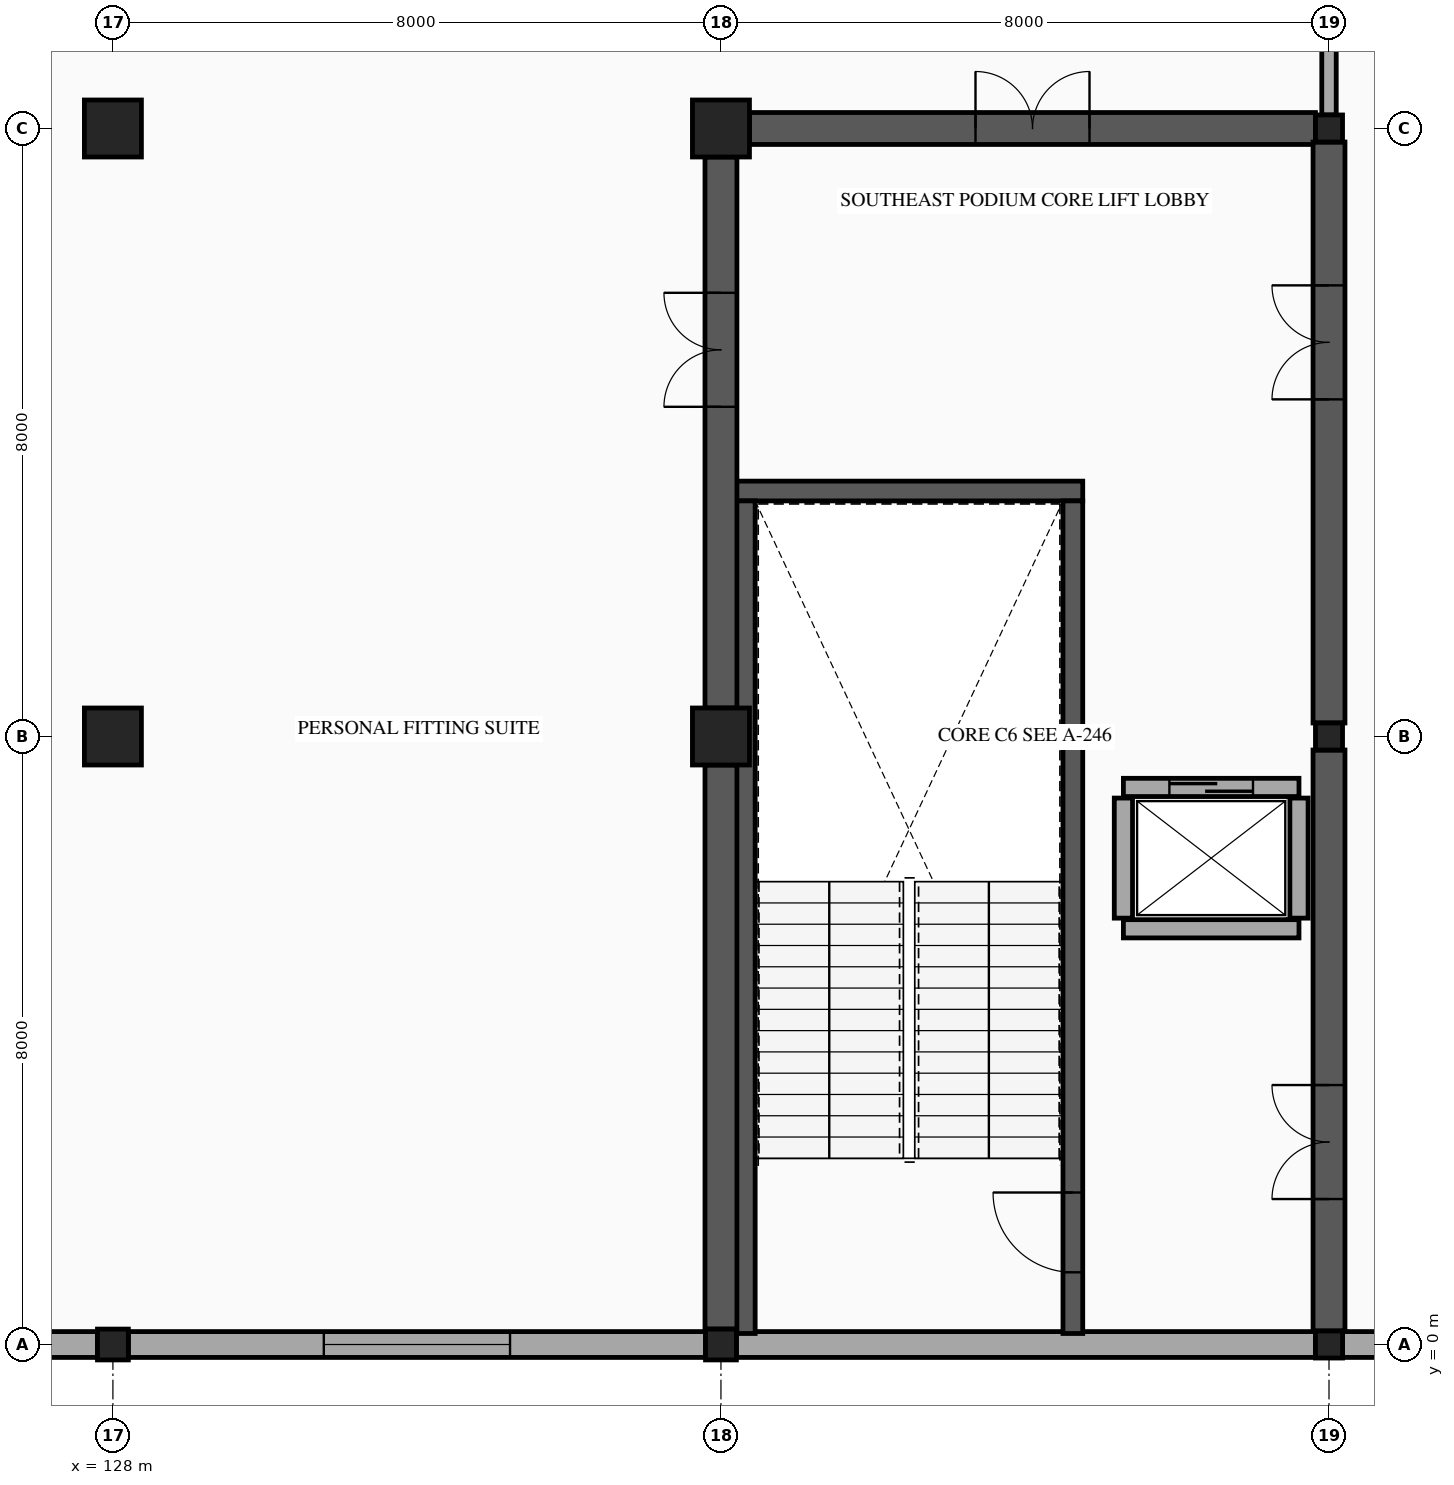
"""IFC4 building model, lengths in metres.
Left out: names, types, materials, properties, quantities, classifications, styles, units other than length and angle.
Written with IfcOpenShell. Run it as: python <this file> out.ifc"""

import sys

from ifc_helpers import new_model, si_unit, direction, frame, frame_2d, origin, origin_2d, place, context, subcontext, project, spatial, rectangle, hollow_rectangle, extrude, element, fill, save


model = new_model("IFC4")
c1 = context("Model", 3, precision=1e-05, world=origin(), true_north=direction((0.0, 1.0)))
c2 = subcontext(c1, "Body", "Model", "MODEL_VIEW")
j1 = project(units=[si_unit("LENGTHUNIT", "METRE"), si_unit("PLANEANGLEUNIT", "RADIAN")], contexts=[c1])
p1 = place(None, origin())
s1 = spatial("IfcSite", under=j1, at=p1, CompositionType="ELEMENT")
p2 = place(p1, origin())
s2 = spatial("IfcBuilding", under=s1, at=p2, CompositionType="ELEMENT")
p3 = place(p2, frame((0.0, 0.0, 5.6)))
s3 = spatial("IfcBuildingStorey", under=s2, at=p3, CompositionType="ELEMENT", Elevation=5.6)
p4 = place(p3, frame((128.0, 0.0, 0.0), z_axis=(0.0, 0.0, 1.0), x_axis=(1.0, 0.0, 0.0)))
e1 = element("IfcColumn", 1, at=p4, inside=s3, PredefinedType="COLUMN", context=c2, shape_type="SweptSolid", body=[
    extrude(hollow_rectangle(XDim=0.406, YDim=0.406, WallThickness=0.015, InnerFilletRadius=0.015, OuterFilletRadius=0.029, at=origin_2d()), origin(), (0.0, 0.0, 1.0), 4.8),
])
for number, where, z_axis, x_axis in (
    (2, (128.0, 8.0, 0.0), (0.0, 0.0, 1.0), (1.0, 0.0, 0.0)),
    (3, (128.0, 16.0, 0.0), (0.0, 0.0, 1.0), (1.0, 0.0, 0.0)),
):
    element("IfcColumn", number, at=place(p3, frame(where, z_axis=z_axis, x_axis=x_axis)), inside=s3, PredefinedType="COLUMN", context=c2, shape_type="SweptSolid", body=[
        extrude(rectangle(XDim=0.75, YDim=0.75, at=origin_2d()), origin(), (0.0, 0.0, 1.0), 4.8),
    ])
p5 = place(p3, frame((136.0, 0.0, 0.0), z_axis=(0.0, 0.0, 1.0), x_axis=(1.0, 0.0, 0.0)))
e4 = element("IfcColumn", 4, at=p5, inside=s3, PredefinedType="COLUMN", context=c2, shape_type="SweptSolid", body=[
    extrude(hollow_rectangle(XDim=0.406, YDim=0.406, WallThickness=0.015, InnerFilletRadius=0.015, OuterFilletRadius=0.029, at=origin_2d()), origin(), (0.0, 0.0, 1.0), 4.8),
])
for number, where, z_axis, x_axis in (
    (5, (136.0, 8.0, 0.0), (0.0, 0.0, 1.0), (1.0, 0.0, 0.0)),
    (6, (136.0, 16.0, 0.0), (0.0, 0.0, 1.0), (1.0, 0.0, 0.0)),
):
    element("IfcColumn", number, at=place(p3, frame(where, z_axis=z_axis, x_axis=x_axis)), inside=s3, PredefinedType="COLUMN", context=c2, shape_type="SweptSolid", body=[
        extrude(rectangle(XDim=0.75, YDim=0.75, at=origin_2d()), origin(), (0.0, 0.0, 1.0), 4.8),
    ])
for number, where, z_axis, x_axis in (
    (7, (144.0, 0.0, 0.0), (0.0, 0.0, 1.0), (1.0, 0.0, 0.0)),
    (8, (144.0, 8.0, 0.0), (0.0, 0.0, 1.0), (1.0, 0.0, 0.0)),
    (9, (144.0, 16.0, 0.0), (0.0, 0.0, 1.0), (1.0, 0.0, 0.0)),
):
    element("IfcColumn", number, at=place(p3, frame(where, z_axis=z_axis, x_axis=x_axis)), inside=s3, PredefinedType="COLUMN", context=c2, shape_type="SweptSolid", body=[
        extrude(hollow_rectangle(XDim=0.356, YDim=0.356, WallThickness=0.012, InnerFilletRadius=0.012, OuterFilletRadius=0.024, at=origin_2d()), origin(), (0.0, 0.0, 1.0), 4.8),
    ])
p6 = place(p3, frame((151.822, 0.0, 0.0), z_axis=(0.0, 0.0, 1.0), x_axis=(-1.0, 0.0, 0.0)))
e10 = element("IfcWall", 10, at=p6, inside=s3, PredefinedType="STANDARD", context=c2, shape_type="SweptSolid", body=[
    extrude(rectangle(XDim=7.644, YDim=0.34, at=frame_2d((3.822, 0.0))), origin(), (0.0, 0.0, 1.0), 3.78),
])
p7 = place(p6, frame((2.597, 0.0, 0.8)))
e11 = element("IfcOpeningElement", 11, at=p7, cuts=e10, PredefinedType="OPENING", context=c2, shape_type="SweptSolid", body=[
    extrude(rectangle(XDim=2.45, YDim=1.85, at=frame_2d((1.225, 0.925))), frame((0.0, 0.18, 0.0), z_axis=(0.0, -1.0, 0.0), x_axis=(1.0, 0.0, 0.0)), (0.0, 0.0, 1.0), 0.36),
])
p8 = place(p3, frame((143.822, 0.0, 0.0), z_axis=(0.0, 0.0, 1.0), x_axis=(-1.0, 0.0, 0.0)))
e12 = element("IfcWall", 12, at=p8, inside=s3, PredefinedType="STANDARD", context=c2, shape_type="SweptSolid", body=[
    extrude(rectangle(XDim=7.619, YDim=0.34, at=frame_2d((3.81, 0.0))), origin(), (0.0, 0.0, 1.0), 3.78),
])
p9 = place(p3, frame((135.797, 0.0, 0.0), z_axis=(0.0, 0.0, 1.0), x_axis=(-1.0, 0.0, 0.0)))
e13 = element("IfcWall", 13, at=p9, inside=s3, PredefinedType="STANDARD", context=c2, shape_type="SweptSolid", body=[
    extrude(rectangle(XDim=7.594, YDim=0.34, at=frame_2d((3.797, 0.0))), origin(), (0.0, 0.0, 1.0), 3.78),
])
p10 = place(p9, frame((2.572, 0.0, 0.8)))
e14 = element("IfcOpeningElement", 14, at=p10, cuts=e13, PredefinedType="OPENING", context=c2, shape_type="SweptSolid", body=[
    extrude(rectangle(XDim=2.45, YDim=1.85, at=frame_2d((1.225, 0.925))), frame((0.0, 0.18, 0.0), z_axis=(0.0, -1.0, 0.0), x_axis=(1.0, 0.0, 0.0)), (0.0, 0.0, 1.0), 0.36),
])
p11 = place(p3, frame((127.797, 0.0, 0.0), z_axis=(0.0, 0.0, 1.0), x_axis=(-1.0, 0.0, 0.0)))
e15 = element("IfcWall", 15, at=p11, inside=s3, PredefinedType="STANDARD", context=c2, shape_type="SweptSolid", body=[
    extrude(rectangle(XDim=7.594, YDim=0.34, at=frame_2d((3.797, 0.0))), origin(), (0.0, 0.0, 1.0), 3.78),
])
p12 = place(p3, frame((136.19, 11.23, 0.0), z_axis=(0.0, 0.0, 1.0), x_axis=(1.0, 0.0, 0.0)))
e16 = element("IfcWall", 16, at=p12, inside=s3, PredefinedType="SHEAR", context=c2, shape_type="SweptSolid", body=[
    extrude(rectangle(XDim=4.57, YDim=0.26, at=frame_2d((2.285, 0.0))), origin(), (0.0, 0.0, 1.0), 4.58),
])
p13 = place(p3, frame((136.32, 0.145, 0.0), z_axis=(0.0, 0.0, 1.0), x_axis=(0.0, 1.0, 0.0)))
e17 = element("IfcWall", 17, at=p13, inside=s3, PredefinedType="SHEAR", context=c2, shape_type="SweptSolid", body=[
    extrude(rectangle(XDim=10.955, YDim=0.26, at=frame_2d((5.478, 0.0))), origin(), (0.0, 0.0, 1.0), 4.58),
])
p14 = place(p3, frame((140.63, 0.145, 0.0), z_axis=(0.0, 0.0, 1.0), x_axis=(0.0, 1.0, 0.0)))
e18 = element("IfcWall", 18, at=p14, inside=s3, PredefinedType="SHEAR", context=c2, shape_type="SweptSolid", body=[
    extrude(rectangle(XDim=10.955, YDim=0.26, at=frame_2d((5.478, 0.0))), origin(), (0.0, 0.0, 1.0), 4.58),
])
p15 = place(p14, frame((0.805, 0.0, 0.0)))
e19 = element("IfcOpeningElement", 19, at=p15, cuts=e18, PredefinedType="OPENING", context=c2, shape_type="SweptSolid", body=[
    extrude(rectangle(XDim=1.05, YDim=2.15, at=frame_2d((0.525, 1.075))), frame((0.0, 0.14, 0.0), z_axis=(0.0, -1.0, 0.0), x_axis=(1.0, 0.0, 0.0)), (0.0, 0.0, 1.0), 0.28),
])
p16 = place(p3, frame((136.375, 16.0, 0.0), z_axis=(0.0, 0.0, 1.0), x_axis=(1.0, 0.0, 0.0)))
e20 = element("IfcWall", 20, at=p16, inside=s3, PredefinedType="SHEAR", context=c2, shape_type="SweptSolid", body=[
    extrude(rectangle(XDim=7.447, YDim=0.42, at=frame_2d((3.724, 0.0))), origin(), (0.0, 0.0, 1.0), 4.58),
])
p17 = place(p16, frame((2.974, 0.0, 0.0)))
e21 = element("IfcOpeningElement", 21, at=p17, cuts=e20, PredefinedType="OPENING", context=c2, shape_type="SweptSolid", body=[
    extrude(rectangle(XDim=1.5, YDim=2.15, at=frame_2d((0.75, 1.075))), frame((0.0, 0.22, 0.0), z_axis=(0.0, -1.0, 0.0), x_axis=(1.0, 0.0, 0.0)), (0.0, 0.0, 1.0), 0.44),
])
p18 = place(p3, frame((136.0, 0.203, 0.0), z_axis=(0.0, 0.0, 1.0), x_axis=(0.0, 1.0, 0.0)))
e22 = element("IfcWall", 22, at=p18, inside=s3, PredefinedType="SHEAR", context=c2, shape_type="SweptSolid", body=[
    extrude(rectangle(XDim=7.422, YDim=0.42, at=frame_2d((3.711, 0.0))), origin(), (0.0, 0.0, 1.0), 4.58),
])
p19 = place(p3, frame((136.0, 8.375, 0.0), z_axis=(0.0, 0.0, 1.0), x_axis=(0.0, 1.0, 0.0)))
e23 = element("IfcWall", 23, at=p19, inside=s3, PredefinedType="SHEAR", context=c2, shape_type="SweptSolid", body=[
    extrude(rectangle(XDim=7.25, YDim=0.42, at=frame_2d((3.625, 0.0))), origin(), (0.0, 0.0, 1.0), 4.58),
])
p20 = place(p19, frame((3.963, 0.0, 0.0)))
e24 = element("IfcOpeningElement", 24, at=p20, cuts=e23, PredefinedType="OPENING", context=c2, shape_type="SweptSolid", body=[
    extrude(rectangle(XDim=1.5, YDim=2.15, at=frame_2d((0.75, 1.075))), frame((0.0, 0.22, 0.0), z_axis=(0.0, -1.0, 0.0), x_axis=(1.0, 0.0, 0.0)), (0.0, 0.0, 1.0), 0.44),
])
p21 = place(p3, frame((144.0, 0.178, 0.0), z_axis=(0.0, 0.0, 1.0), x_axis=(0.0, 1.0, 0.0)))
e25 = element("IfcWall", 25, at=p21, inside=s3, PredefinedType="SHEAR", context=c2, shape_type="SweptSolid", body=[
    extrude(rectangle(XDim=7.644, YDim=0.42, at=frame_2d((3.822, 0.0))), origin(), (0.0, 0.0, 1.0), 4.58),
])
p22 = place(p21, frame((1.736, 0.0, 0.0)))
e26 = element("IfcOpeningElement", 26, at=p22, cuts=e25, PredefinedType="OPENING", context=c2, shape_type="SweptSolid", body=[
    extrude(rectangle(XDim=1.5, YDim=2.15, at=frame_2d((0.75, 1.075))), frame((0.0, 0.22, 0.0), z_axis=(0.0, -1.0, 0.0), x_axis=(1.0, 0.0, 0.0)), (0.0, 0.0, 1.0), 0.44),
])
p23 = place(p3, frame((144.0, 8.178, 0.0), z_axis=(0.0, 0.0, 1.0), x_axis=(0.0, 1.0, 0.0)))
e27 = element("IfcWall", 27, at=p23, inside=s3, PredefinedType="SHEAR", context=c2, shape_type="SweptSolid", body=[
    extrude(rectangle(XDim=7.644, YDim=0.42, at=frame_2d((3.822, 0.0))), origin(), (0.0, 0.0, 1.0), 4.58),
])
p24 = place(p23, frame((4.258, 0.0, 0.0)))
e28 = element("IfcOpeningElement", 28, at=p24, cuts=e27, PredefinedType="OPENING", context=c2, shape_type="SweptSolid", body=[
    extrude(rectangle(XDim=1.5, YDim=2.15, at=frame_2d((0.75, 1.075))), frame((0.0, 0.22, 0.0), z_axis=(0.0, -1.0, 0.0), x_axis=(1.0, 0.0, 0.0)), (0.0, 0.0, 1.0), 0.44),
])
p25 = place(p3, frame((141.295, 7.33, 0.0), z_axis=(0.0, 0.0, 1.0), x_axis=(1.0, 0.0, 0.0)))
e29 = element("IfcWall", 29, at=p25, inside=s3, PredefinedType="PARTITIONING", context=c2, shape_type="SweptSolid", body=[
    extrude(rectangle(XDim=2.31, YDim=0.24, at=frame_2d((1.155, 0.0))), origin(), (0.0, 0.0, 1.0), 4.58),
])
p26 = place(p25, frame((0.605, 0.0, 0.0)))
e30 = element("IfcOpeningElement", 30, at=p26, cuts=e29, PredefinedType="OPENING", context=c2, shape_type="SweptSolid", body=[
    extrude(rectangle(XDim=1.1, YDim=2.15, at=frame_2d((0.55, 1.075))), frame((0.0, 0.13, 0.0), z_axis=(0.0, -1.0, 0.0), x_axis=(1.0, 0.0, 0.0)), (0.0, 0.0, 1.0), 0.26),
])
p27 = place(p3, frame((141.295, 5.47, 0.0), z_axis=(0.0, 0.0, 1.0), x_axis=(1.0, 0.0, 0.0)))
e31 = element("IfcWall", 31, at=p27, inside=s3, PredefinedType="PARTITIONING", context=c2, shape_type="SweptSolid", body=[
    extrude(rectangle(XDim=2.31, YDim=0.24, at=frame_2d((1.155, 0.0))), origin(), (0.0, 0.0, 1.0), 4.58),
])
for number, where, z_axis, x_axis in (
    (32, (141.295, 5.61, 0.0), (0.0, 0.0, 1.0), (0.0, 1.0, 0.0)),
    (33, (143.605, 5.61, 0.0), (0.0, 0.0, 1.0), (0.0, 1.0, 0.0)),
):
    element("IfcWall", number, at=place(p3, frame(where, z_axis=z_axis, x_axis=x_axis)), inside=s3, PredefinedType="PARTITIONING", context=c2, shape_type="SweptSolid", body=[
        extrude(rectangle(XDim=1.58, YDim=0.24, at=frame_2d((0.79, 0.0))), origin(), (0.0, 0.0, 1.0), 4.58),
    ])
p28 = place(p3, frame((144.0, 16.178, 0.0), z_axis=(0.0, 0.0, 1.0), x_axis=(0.0, 1.0, 0.0)))
e34 = element("IfcWall", 34, at=p28, inside=s3, PredefinedType="PARTITIONING", context=c2, shape_type="SweptSolid", body=[
    extrude(rectangle(XDim=15.672, YDim=0.19, at=frame_2d((7.836, 0.0))), origin(), (0.0, 0.0, 1.0), 3.78),
])
p29 = place(p28, frame((10.828, 0.0, 0.0)))
e35 = element("IfcOpeningElement", 35, at=p29, cuts=e34, PredefinedType="OPENING", context=c2, shape_type="SweptSolid", body=[
    extrude(rectangle(XDim=1.8, YDim=2.25, at=frame_2d((0.9, 1.125))), frame((0.0, 0.105, 0.0), z_axis=(0.0, -1.0, 0.0), x_axis=(1.0, 0.0, 0.0)), (0.0, 0.0, 1.0), 0.21),
])
p30 = place(p10, origin())
e36 = element("IfcWindow", 36, at=p30, inside=s3, PartitioningType="DOUBLE_PANEL_VERTICAL", PredefinedType="WINDOW", context=c2, shape_type="SweptSolid", body=[
    extrude(rectangle(XDim=2.45, YDim=1.85, at=frame_2d((1.225, 0.925))), frame((0.0, 0.03, 0.0), z_axis=(0.0, -1.0, 0.0), x_axis=(1.0, 0.0, 0.0)), (0.0, 0.0, 1.0), 0.06),
])
fill(e14, e36)
p31 = place(p15, origin())
e37 = element("IfcDoor", 37, at=p31, inside=s3, OperationType="SINGLE_SWING_RIGHT", PredefinedType="DOOR", context=c2, shape_type="SweptSolid", body=[
    extrude(rectangle(XDim=1.05, YDim=2.15, at=frame_2d((0.525, 1.075))), frame((0.0, 0.025, 0.0), z_axis=(0.0, -1.0, 0.0), x_axis=(1.0, 0.0, 0.0)), (0.0, 0.0, 1.0), 0.05),
])
fill(e19, e37)
p32 = place(p17, origin())
e38 = element("IfcDoor", 38, at=p32, inside=s3, OperationType="DOUBLE_DOOR_SINGLE_SWING", PredefinedType="DOOR", context=c2, shape_type="SweptSolid", body=[
    extrude(rectangle(XDim=1.5, YDim=2.15, at=frame_2d((0.75, 1.075))), frame((0.0, 0.025, 0.0), z_axis=(0.0, -1.0, 0.0), x_axis=(1.0, 0.0, 0.0)), (0.0, 0.0, 1.0), 0.05),
])
fill(e21, e38)
p33 = place(p20, origin())
e39 = element("IfcDoor", 39, at=p33, inside=s3, OperationType="DOUBLE_DOOR_SINGLE_SWING", PredefinedType="DOOR", context=c2, shape_type="SweptSolid", body=[
    extrude(rectangle(XDim=1.5, YDim=2.15, at=frame_2d((0.75, 1.075))), frame((0.0, 0.025, 0.0), z_axis=(0.0, -1.0, 0.0), x_axis=(1.0, 0.0, 0.0)), (0.0, 0.0, 1.0), 0.05),
])
fill(e24, e39)
p34 = place(p22, origin())
e40 = element("IfcDoor", 40, at=p34, inside=s3, OperationType="DOUBLE_DOOR_SINGLE_SWING", PredefinedType="DOOR", context=c2, shape_type="SweptSolid", body=[
    extrude(rectangle(XDim=1.5, YDim=2.15, at=frame_2d((0.75, 1.075))), frame((0.0, 0.025, 0.0), z_axis=(0.0, -1.0, 0.0), x_axis=(1.0, 0.0, 0.0)), (0.0, 0.0, 1.0), 0.05),
])
fill(e26, e40)
p35 = place(p24, origin())
e41 = element("IfcDoor", 41, at=p35, inside=s3, OperationType="DOUBLE_DOOR_SINGLE_SWING", PredefinedType="DOOR", context=c2, shape_type="SweptSolid", body=[
    extrude(rectangle(XDim=1.5, YDim=2.15, at=frame_2d((0.75, 1.075))), frame((0.0, 0.025, 0.0), z_axis=(0.0, -1.0, 0.0), x_axis=(1.0, 0.0, 0.0)), (0.0, 0.0, 1.0), 0.05),
])
fill(e28, e41)
p36 = place(p26, origin())
e42 = element("IfcDoor", 42, at=p36, inside=s3, OperationType="SLIDING_TO_LEFT", PredefinedType="DOOR", context=c2, shape_type="SweptSolid", body=[
    extrude(rectangle(XDim=1.1, YDim=2.15, at=frame_2d((0.55, 1.075))), frame((0.0, 0.025, 0.0), z_axis=(0.0, -1.0, 0.0), x_axis=(1.0, 0.0, 0.0)), (0.0, 0.0, 1.0), 0.05),
])
fill(e30, e42)
save(model, sys.argv[1])
